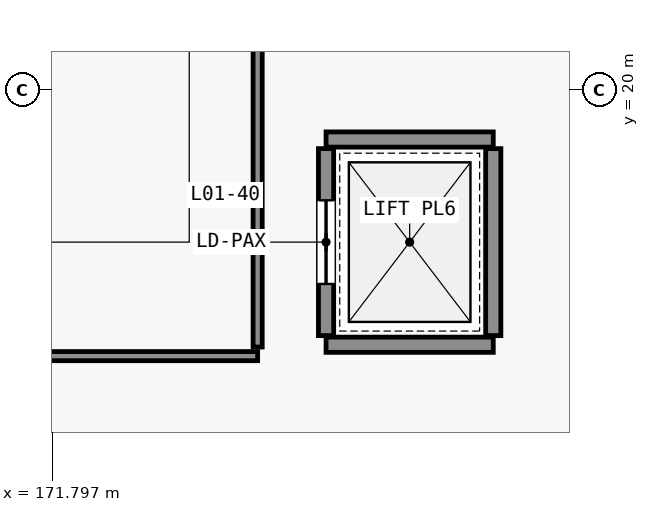
"""IFC4 building model, lengths in metres.
Left out: names, types, materials, properties, quantities, classifications, styles, units other than length and angle.
Written with IfcOpenShell. Run it as: python <this file> out.ifc"""

import sys

from ifc_helpers import new_model, si_unit, direction, frame, frame_2d, origin, place, context, subcontext, project, spatial, rectangle, extrude, element, fill, save


model = new_model("IFC4")
c1 = context("Model", 3, precision=1e-05, world=origin(), true_north=direction((0.0, 1.0)))
c2 = subcontext(c1, "Body", "Model", "MODEL_VIEW")
j1 = project(units=[si_unit("LENGTHUNIT", "METRE"), si_unit("PLANEANGLEUNIT", "RADIAN")], contexts=[c1])
p1 = place(None, origin())
s1 = spatial("IfcSite", under=j1, at=p1, CompositionType="ELEMENT")
p2 = place(p1, origin())
s2 = spatial("IfcBuilding", under=s1, at=p2, CompositionType="ELEMENT")
p3 = place(p2, frame((0.0, 0.0, 6.0)))
s3 = spatial("IfcBuildingStorey", under=s2, at=p3, CompositionType="ELEMENT", Elevation=6.0)
for number, where, z_axis, x_axis in (
    (1, (175.4, 16.65, 0.0), (0.0, 0.0, 1.0), (1.0, 0.0, 0.0)),
    (2, (175.4, 19.35, 0.0), (0.0, 0.0, 1.0), (1.0, 0.0, 0.0)),
):
    element("IfcWall", number, at=place(p3, frame(where, z_axis=z_axis, x_axis=x_axis)), inside=s3, PredefinedType="STANDARD", context=c2, shape_type="SweptSolid", body=[
        extrude(rectangle(XDim=2.2, YDim=0.2, at=frame_2d((1.1, 0.0))), origin(), (0.0, 0.0, 1.0), 5.04),
    ])
p4 = place(p3, frame((175.4, 16.77, 0.0), z_axis=(0.0, 0.0, 1.0), x_axis=(0.0, 1.0, 0.0)))
e3 = element("IfcWall", 3, at=p4, inside=s3, PredefinedType="STANDARD", context=c2, shape_type="SweptSolid", body=[
    extrude(rectangle(XDim=2.46, YDim=0.2, at=frame_2d((1.23, 0.0))), origin(), (0.0, 0.0, 1.0), 5.04),
])
p5 = place(p4, frame((0.68, 0.0, 0.0)))
e4 = element("IfcOpeningElement", 4, at=p5, cuts=e3, PredefinedType="OPENING", context=c2, shape_type="SweptSolid", body=[
    extrude(rectangle(XDim=1.1, YDim=2.15, at=frame_2d((0.55, 1.075))), frame((0.0, 0.11, 0.0), z_axis=(0.0, -1.0, 0.0), x_axis=(1.0, 0.0, 0.0)), (0.0, 0.0, 1.0), 0.22),
])
p6 = place(p3, frame((177.6, 16.77, 0.0), z_axis=(0.0, 0.0, 1.0), x_axis=(0.0, 1.0, 0.0)))
e5 = element("IfcWall", 5, at=p6, inside=s3, PredefinedType="STANDARD", context=c2, shape_type="SweptSolid", body=[
    extrude(rectangle(XDim=2.46, YDim=0.2, at=frame_2d((1.23, 0.0))), origin(), (0.0, 0.0, 1.0), 5.04),
])
p7 = place(p3, frame((144.5, 16.5, 0.0), z_axis=(0.0, 0.0, 1.0), x_axis=(1.0, 0.0, 0.0)))
e6 = element("IfcWall", 6, at=p7, inside=s3, PredefinedType="PARTITIONING", context=c2, shape_type="SweptSolid", body=[
    extrude(rectangle(XDim=30.0, YDim=0.12, at=frame_2d((15.0, 0.0))), origin(), (0.0, 0.0, 1.0), 4.347),
])
p8 = place(p7, frame((14.1, 0.0, 0.0)))
e7 = element("IfcOpeningElement", 7, at=p8, cuts=e6, PredefinedType="OPENING", context=c2, shape_type="SweptSolid", body=[
    extrude(rectangle(XDim=1.8, YDim=2.35, at=frame_2d((0.9, 1.175))), frame((0.0, 0.07, 0.0), z_axis=(0.0, -1.0, 0.0), x_axis=(1.0, 0.0, 0.0)), (0.0, 0.0, 1.0), 0.14),
])
p9 = place(p3, frame((174.5, 16.62, 0.0), z_axis=(0.0, 0.0, 1.0), x_axis=(0.0, 1.0, 0.0)))
e8 = element("IfcWall", 8, at=p9, inside=s3, PredefinedType="PARTITIONING", context=c2, shape_type="SweptSolid", body=[
    extrude(rectangle(XDim=48.76, YDim=0.12, at=frame_2d((24.38, 0.0))), origin(), (0.0, 0.0, 1.0), 4.347),
])
p10 = place(p5, origin())
e9 = element("IfcDoor", 9, at=p10, inside=s3, OperationType="SLIDING_TO_LEFT", PredefinedType="DOOR", context=c2, shape_type="SweptSolid", body=[
    extrude(rectangle(XDim=1.1, YDim=2.15, at=frame_2d((0.55, 1.075))), frame((0.0, 0.025, 0.0), z_axis=(0.0, -1.0, 0.0), x_axis=(1.0, 0.0, 0.0)), (0.0, 0.0, 1.0), 0.05),
])
fill(e4, e9)
save(model, sys.argv[1])
